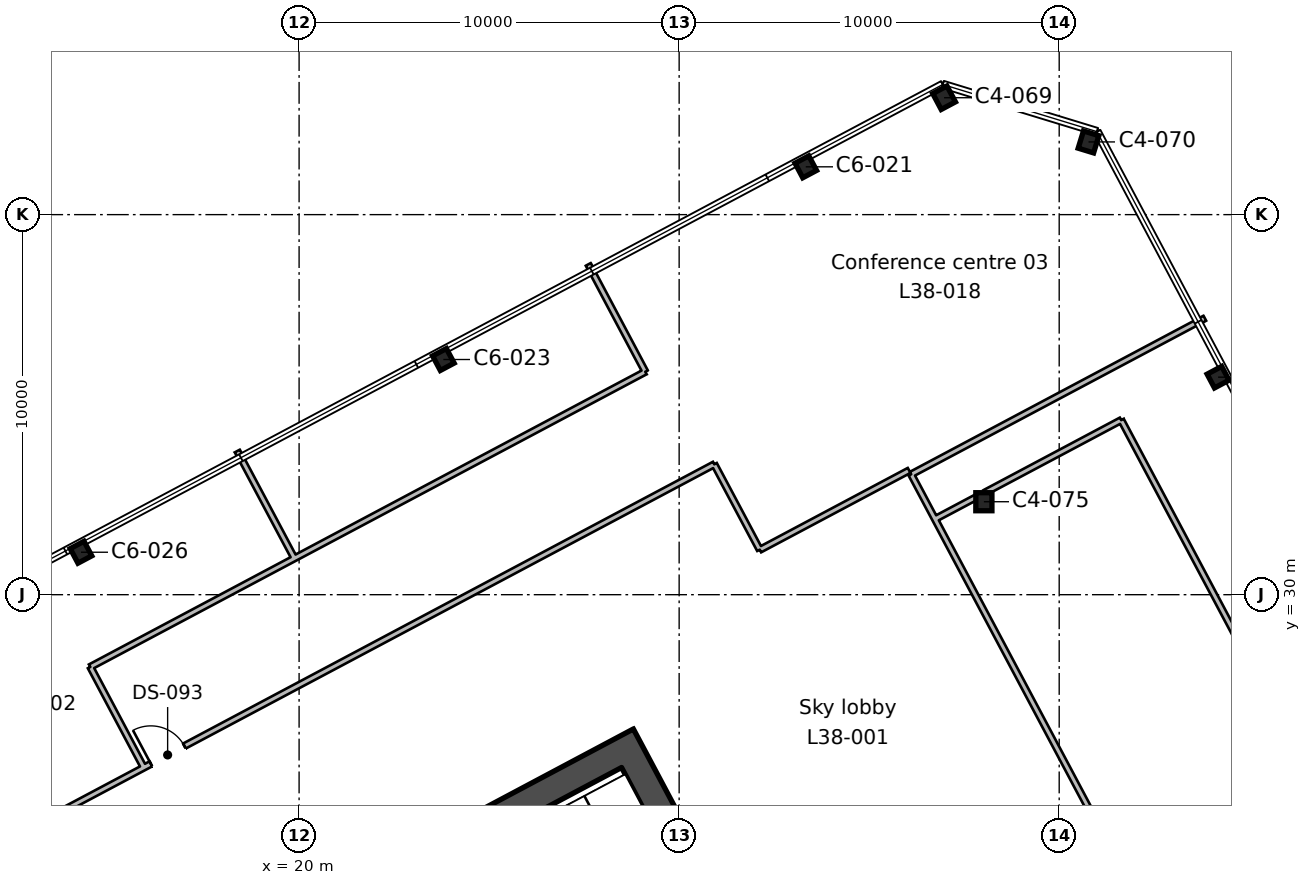
"""IFC4 building model, lengths in metres.
Left out: names, types, materials, properties, quantities, classifications, styles, units other than length and angle.
Written with IfcOpenShell. Run it as: python <this file> out.ifc"""

import sys

from ifc_helpers import new_model, si_unit, direction, frame, frame_2d, origin, origin_2d, place, context, subcontext, project, spatial, rectangle, i_section, extrude, element, fill, save


model = new_model("IFC4")
c1 = context("Model", 3, precision=1e-05, world=origin(), true_north=direction((0.0, 1.0)))
c2 = subcontext(c1, "Body", "Model", "MODEL_VIEW")
j1 = project(units=[si_unit("LENGTHUNIT", "METRE"), si_unit("PLANEANGLEUNIT", "RADIAN")], contexts=[c1])
p1 = place(None, origin())
s1 = spatial("IfcSite", under=j1, at=p1, CompositionType="ELEMENT")
p2 = place(p1, origin())
s2 = spatial("IfcBuilding", under=s1, at=p2, CompositionType="ELEMENT")
p3 = place(p2, frame((0.0, 0.0, 178.2)))
s3 = spatial("IfcBuildingStorey", under=s2, at=p3, CompositionType="ELEMENT", Elevation=178.2)
p4 = place(p3, frame((14.261, 31.117, 0.0), z_axis=(0.0, 0.0, 1.0), x_axis=(-0.882947592859, -0.469471562786, 0.0)))
e1 = element("IfcColumn", 1, at=p4, inside=s3, PredefinedType="COLUMN", context=c2, shape_type="SweptSolid", body=[
    extrude(i_section(OverallWidth=0.412, OverallDepth=0.434, WebThickness=0.036, FlangeThickness=0.057, FilletRadius=0.015, at=origin_2d()), origin(), (0.0, 0.0, 1.0), 5.4),
])
p5 = place(p3, frame((38.018, 32.446, 0.0), z_axis=(0.0, 0.0, 1.0), x_axis=(1.0, 0.0, 0.0)))
e2 = element("IfcColumn", 2, at=p5, inside=s3, PredefinedType="COLUMN", context=c2, shape_type="SweptSolid", body=[
    extrude(i_section(OverallWidth=0.424, OverallDepth=0.475, WebThickness=0.048, FlangeThickness=0.077, FilletRadius=0.015, at=origin_2d()), origin(), (0.0, 0.0, 1.0), 5.4),
])
for number, where, z_axis, x_axis in (
    (3, (44.181, 35.723, 0.0), (0.0, 0.0, 1.0), (-0.469, 0.883, 0.0)),
    (4, (23.796, 36.188, 0.0), (0.0, 0.0, 1.0), (-0.883, -0.469, 0.0)),
    (5, (33.332, 41.258, 0.0), (0.0, 0.0, 1.0), (-0.883, -0.469, 0.0)),
):
    element("IfcColumn", number, at=place(p3, frame(where, z_axis=z_axis, x_axis=x_axis)), inside=s3, PredefinedType="COLUMN", context=c2, shape_type="SweptSolid", body=[
        extrude(i_section(OverallWidth=0.412, OverallDepth=0.434, WebThickness=0.036, FlangeThickness=0.057, FilletRadius=0.015, at=origin_2d()), origin(), (0.0, 0.0, 1.0), 5.4),
    ])
for number, where, z_axis, x_axis in (
    (6, (40.772, 41.913, 0.0), (0.0, 0.0, 1.0), (-0.956, 0.292, 0.0)),
    (7, (36.971, 43.076, 0.0), (0.0, 0.0, 1.0), (-0.883, -0.469, 0.0)),
):
    element("IfcColumn", number, at=place(p3, frame(where, z_axis=z_axis, x_axis=x_axis)), inside=s3, PredefinedType="COLUMN", context=c2, shape_type="SweptSolid", body=[
        extrude(i_section(OverallWidth=0.424, OverallDepth=0.475, WebThickness=0.048, FlangeThickness=0.077, FilletRadius=0.015, at=origin_2d()), origin(), (0.0, 0.0, 1.0), 5.4),
    ])
p6 = place(p3, frame((37.713, 8.896, 0.0), z_axis=(0.0, 0.0, 1.0), x_axis=(-0.469469918705, 0.88294846703, 0.0)))
e8 = element("IfcWall", 8, at=p6, inside=s3, PredefinedType="SHEAR", context=c2, shape_type="SweptSolid", body=[
    extrude(rectangle(XDim=19.7, YDim=0.75, at=frame_2d((9.85, 0.0))), origin(), (0.0, 0.0, 1.0), 5.4),
])
p7 = place(p6, frame((10.45, 0.0, 0.0)))
e9 = element("IfcOpeningElement", 9, at=p7, cuts=e8, PredefinedType="OPENING", context=c2, shape_type="SweptSolid", body=[
    extrude(rectangle(XDim=2.4, YDim=2.4, at=frame_2d((1.2, 1.2))), frame((0.0, 0.385, 0.0), z_axis=(0.0, -1.0, 0.0), x_axis=(1.0, 0.0, 0.0)), (0.0, 0.0, 1.0), 0.77),
])
p8 = place(p3, frame((10.474, 16.3, 0.0), z_axis=(0.0, 0.0, 1.0), x_axis=(0.88295010195, 0.469466843842, 0.0)))
e10 = element("IfcWall", 10, at=p8, inside=s3, PredefinedType="SHEAR", context=c2, shape_type="SweptSolid", body=[
    extrude(rectangle(XDim=20.2, YDim=0.75, at=frame_2d((10.1, 0.0))), origin(), (0.0, 0.0, 1.0), 5.4),
])
p9 = place(p3, frame((2.811, 18.483, 0.0), z_axis=(0.0, 0.0, 1.0), x_axis=(0.882947985302, 0.469470824707, 0.0)))
e11 = element("IfcWall", 11, at=p9, inside=s3, PredefinedType="PARTITIONING", context=c2, shape_type="SweptSolid", body=[
    extrude(rectangle(XDim=18.116, YDim=0.15, at=frame_2d((9.058, 0.0))), origin(), (0.0, 0.0, 1.0), 4.95),
])
p10 = place(p9, frame((15.05, 0.0, 0.0)))
e12 = element("IfcOpeningElement", 12, at=p10, cuts=e11, PredefinedType="OPENING", context=c2, shape_type="SweptSolid", body=[
    extrude(rectangle(XDim=1.0, YDim=2.1, at=frame_2d((0.5, 1.05))), frame((0.0, 0.085, 0.0), z_axis=(0.0, -1.0, 0.0), x_axis=(1.0, 0.0, 0.0)), (0.0, 0.0, 1.0), 0.17),
])
p11 = place(p9, frame((8.55, 0.0, 0.0)))
e13 = element("IfcOpeningElement", 13, at=p11, cuts=e11, PredefinedType="OPENING", context=c2, shape_type="SweptSolid", body=[
    extrude(rectangle(XDim=1.0, YDim=2.1, at=frame_2d((0.5, 1.05))), frame((0.0, 0.085, 0.0), z_axis=(0.0, -1.0, 0.0), x_axis=(1.0, 0.0, 0.0)), (0.0, 0.0, 1.0), 0.17),
])
p12 = place(p9, frame((4.05, 0.0, 0.0)))
e14 = element("IfcOpeningElement", 14, at=p12, cuts=e11, PredefinedType="OPENING", context=c2, shape_type="SweptSolid", body=[
    extrude(rectangle(XDim=1.0, YDim=2.1, at=frame_2d((0.5, 1.05))), frame((0.0, 0.085, 0.0), z_axis=(0.0, -1.0, 0.0), x_axis=(1.0, 0.0, 0.0)), (0.0, 0.0, 1.0), 0.17),
])
p13 = place(p3, frame((14.507, 28.1, 0.0), z_axis=(0.0, 0.0, 1.0), x_axis=(0.468983907772, -0.883206710941, 0.0)))
e15 = element("IfcWall", 15, at=p13, inside=s3, PredefinedType="PARTITIONING", context=c2, shape_type="SweptSolid", body=[
    extrude(rectangle(XDim=2.987, YDim=0.15, at=frame_2d((1.494, 0.0))), origin(), (0.0, 0.0, 1.0), 4.95),
])
p14 = place(p3, frame((14.506, 28.099, 0.0), z_axis=(0.0, 0.0, 1.0), x_axis=(0.882904988305, 0.469551681528, 0.0)))
e16 = element("IfcWall", 16, at=p14, inside=s3, PredefinedType="PARTITIONING", context=c2, shape_type="SweptSolid", body=[
    extrude(rectangle(XDim=6.078, YDim=0.15, at=frame_2d((3.039, 0.0))), origin(), (0.0, 0.0, 1.0), 4.95),
])
p15 = place(p3, frame((18.374, 33.78, 0.0), z_axis=(0.0, 0.0, 1.0), x_axis=(0.469685095616, -0.882834022315, 0.0)))
e17 = element("IfcWall", 17, at=p15, inside=s3, PredefinedType="PARTITIONING", context=c2, shape_type="SweptSolid", body=[
    extrude(rectangle(XDim=3.2, YDim=0.15, at=frame_2d((1.6, 0.0))), origin(), (0.0, 0.0, 1.0), 4.95),
])
p16 = place(p3, frame((32.12, 31.183, 0.0), z_axis=(0.0, 0.0, 1.0), x_axis=(-0.469737002115, 0.882806405077, 0.0)))
e18 = element("IfcWall", 18, at=p16, inside=s3, PredefinedType="PARTITIONING", context=c2, shape_type="SweptSolid", body=[
    extrude(rectangle(XDim=2.546, YDim=0.15, at=frame_2d((1.273, 0.0))), origin(), (0.0, 0.0, 1.0), 4.95),
])
p17 = place(p3, frame((18.807, 26.988, 0.0), z_axis=(0.0, 0.0, 1.0), x_axis=(0.882961819029, 0.469444806273, 0.0)))
e19 = element("IfcWall", 19, at=p17, inside=s3, PredefinedType="PARTITIONING", context=c2, shape_type="SweptSolid", body=[
    extrude(rectangle(XDim=13.724, YDim=0.15, at=frame_2d((6.862, 0.0))), origin(), (0.0, 0.0, 1.0), 4.95),
])
p18 = place(p3, frame((19.872, 30.953, 0.0), z_axis=(0.0, 0.0, 1.0), x_axis=(0.882941336492, 0.469483329111, 0.0)))
e20 = element("IfcWall", 20, at=p18, inside=s3, PredefinedType="PARTITIONING", context=c2, shape_type="SweptSolid", body=[
    extrude(rectangle(XDim=10.463, YDim=0.15, at=frame_2d((5.231, 0.0))), origin(), (0.0, 0.0, 1.0), 4.95),
])
p19 = place(p3, frame((29.11, 35.865, 0.0), z_axis=(0.0, 0.0, 1.0), x_axis=(-0.469142209738, 0.883122634203, 0.0)))
e21 = element("IfcWall", 21, at=p19, inside=s3, PredefinedType="PARTITIONING", context=c2, shape_type="SweptSolid", body=[
    extrude(rectangle(XDim=3.2, YDim=0.15, at=frame_2d((1.6, 0.0))), origin(), (0.0, 0.0, 1.0), 4.95),
])
p20 = place(p3, frame((32.122, 31.18, 0.0), z_axis=(0.0, 0.0, 1.0), x_axis=(0.882897554083, 0.469565659939, 0.0)))
e22 = element("IfcWall", 22, at=p20, inside=s3, PredefinedType="PARTITIONING", context=c2, shape_type="SweptSolid", body=[
    extrude(rectangle(XDim=4.45, YDim=0.15, at=frame_2d((2.225, 0.0))), origin(), (0.0, 0.0, 1.0), 4.95),
])
p21 = place(p3, frame((36.104, 33.169, 0.0), z_axis=(0.0, 0.0, 1.0), x_axis=(0.46953826462, -0.882912123633, 0.0)))
e23 = element("IfcWall", 23, at=p21, inside=s3, PredefinedType="PARTITIONING", context=c2, shape_type="SweptSolid", body=[
    extrude(rectangle(XDim=2.547, YDim=0.15, at=frame_2d((1.274, 0.0))), origin(), (0.0, 0.0, 1.0), 4.95),
])
p22 = place(p3, frame((43.832, 37.274, 0.0), z_axis=(0.0, 0.0, 1.0), x_axis=(-0.882953105758, -0.469461194384, 0.0)))
e24 = element("IfcWall", 24, at=p22, inside=s3, PredefinedType="PARTITIONING", context=c2, shape_type="SweptSolid", body=[
    extrude(rectangle(XDim=8.75, YDim=0.15, at=frame_2d((4.375, 0.0))), origin(), (0.0, 0.0, 1.0), 4.95),
])
p23 = place(p3, frame((36.732, 31.989, 0.0), z_axis=(0.0, 0.0, 1.0), x_axis=(0.882946743373, 0.469473160434, 0.0)))
e25 = element("IfcWall", 25, at=p23, inside=s3, PredefinedType="PARTITIONING", context=c2, shape_type="SweptSolid", body=[
    extrude(rectangle(XDim=1.216, YDim=0.15, at=frame_2d((0.608, 0.0))), origin(), (0.0, 0.0, 1.0), 4.95),
])
p24 = place(p3, frame((38.038, 32.683, 0.0), z_axis=(0.0, 0.0, 1.0), x_axis=(0.88295491585, 0.469457789984, 0.0)))
e26 = element("IfcWall", 26, at=p24, inside=s3, PredefinedType="PARTITIONING", context=c2, shape_type="SweptSolid", body=[
    extrude(rectangle(XDim=4.07, YDim=0.15, at=frame_2d((2.035, 0.0))), origin(), (0.0, 0.0, 1.0), 4.95),
])
p25 = place(p3, frame((41.632, 34.594, 0.0), z_axis=(0.0, 0.0, 1.0), x_axis=(0.469489427625, -0.882938093724, 0.0)))
e27 = element("IfcWall", 27, at=p25, inside=s3, PredefinedType="PARTITIONING", context=c2, shape_type="SweptSolid", body=[
    extrude(rectangle(XDim=15.666, YDim=0.15, at=frame_2d((7.833, 0.0))), origin(), (0.0, 0.0, 1.0), 4.95),
])
p26 = place(p3, frame((37.3, 30.92, 0.0), z_axis=(0.0, 0.0, 1.0), x_axis=(0.469485933673, -0.882939951573, 0.0)))
e28 = element("IfcWall", 28, at=p26, inside=s3, PredefinedType="PARTITIONING", context=c2, shape_type="SweptSolid", body=[
    extrude(rectangle(XDim=20.239, YDim=0.15, at=frame_2d((10.12, 0.0))), origin(), (0.0, 0.0, 1.0), 4.95),
])
p27 = place(p26, frame((10.35, 0.0, 0.0)))
e29 = element("IfcOpeningElement", 29, at=p27, cuts=e28, PredefinedType="OPENING", context=c2, shape_type="SweptSolid", body=[
    extrude(rectangle(XDim=1.8, YDim=2.1, at=frame_2d((0.9, 1.05))), frame((0.0, 0.085, 0.0), z_axis=(0.0, -1.0, 0.0), x_axis=(1.0, 0.0, 0.0)), (0.0, 0.0, 1.0), 0.17),
])
p28 = place(p10, origin())
e30 = element("IfcDoor", 30, at=p28, inside=s3, OperationType="SINGLE_SWING_LEFT", PredefinedType="DOOR", context=c2, shape_type="SweptSolid", body=[
    extrude(rectangle(XDim=1.0, YDim=2.1, at=frame_2d((0.5, 1.05))), frame((0.0, 0.025, 0.0), z_axis=(0.0, -1.0, 0.0), x_axis=(1.0, 0.0, 0.0)), (0.0, 0.0, 1.0), 0.05),
])
fill(e12, e30)
save(model, sys.argv[1])
